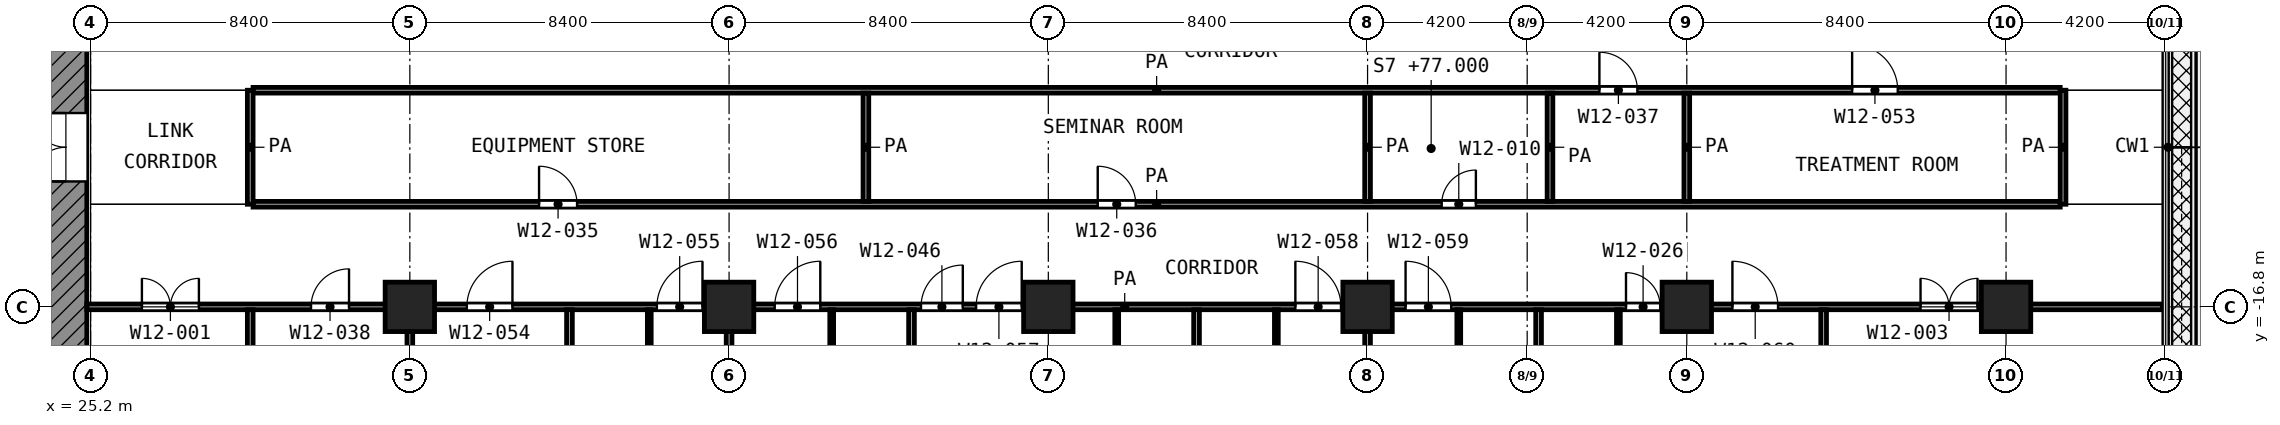
"""IFC4 building model, lengths in metres.
Left out: names, types, materials, properties, quantities, classifications, styles, units other than length and angle.
Written with IfcOpenShell. Run it as: python <this file> out.ifc"""

import sys

from ifc_helpers import new_model, si_unit, direction, frame, frame_2d, origin, origin_2d, place, context, subcontext, project, spatial, rectangle, extrude, element, fill, save


model = new_model("IFC4")
c1 = context("Model", 3, precision=1e-05, world=origin(), true_north=direction((0.0, 1.0)))
c2 = subcontext(c1, "Body", "Model", "MODEL_VIEW")
j1 = project(units=[si_unit("LENGTHUNIT", "METRE"), si_unit("PLANEANGLEUNIT", "RADIAN")], contexts=[c1])
p1 = place(None, origin())
s1 = spatial("IfcSite", under=j1, at=p1, CompositionType="ELEMENT")
p2 = place(p1, origin())
s2 = spatial("IfcBuilding", under=s1, at=p2, CompositionType="ELEMENT")
p3 = place(p2, frame((0.0, 0.0, 77.0)))
s3 = spatial("IfcBuildingStorey", under=s2, at=p3, CompositionType="ELEMENT", Elevation=77.0)
for number, where, z_axis, x_axis in (
    (1, (33.6, -16.8, 0.0), (0.0, 0.0, 1.0), (1.0, 0.0, 0.0)),
    (2, (42.0, -16.8, 0.0), (0.0, 0.0, 1.0), (1.0, 0.0, 0.0)),
    (3, (50.4, -16.8, 0.0), (0.0, 0.0, 1.0), (1.0, 0.0, 0.0)),
    (4, (58.8, -16.8, 0.0), (0.0, 0.0, 1.0), (1.0, 0.0, 0.0)),
    (5, (67.2, -16.8, 0.0), (0.0, 0.0, 1.0), (1.0, 0.0, 0.0)),
    (6, (75.6, -16.8, 0.0), (0.0, 0.0, 1.0), (1.0, 0.0, 0.0)),
):
    element("IfcColumn", number, at=place(p3, frame(where, z_axis=z_axis, x_axis=x_axis)), inside=s3, PredefinedType="COLUMN", context=c2, shape_type="SweptSolid", body=[
        extrude(rectangle(XDim=1.3, YDim=1.3, at=origin_2d()), origin(), (0.0, 0.0, 1.0), 4.2),
    ])
p4 = place(p3, frame((24.55, -24.0, 0.0), z_axis=(0.0, 0.0, 1.0), x_axis=(0.0, 1.0, 0.0)))
e7 = element("IfcWall", 7, at=p4, inside=s3, PredefinedType="SHEAR", context=c2, shape_type="SweptSolid", body=[
    extrude(rectangle(XDim=18.6, YDim=1.1, at=frame_2d((9.3, 0.0))), origin(), (0.0, 0.0, 1.0), 3.9),
])
p5 = place(p4, frame((10.5, 0.0, 0.0)))
e8 = element("IfcOpeningElement", 8, at=p5, cuts=e7, PredefinedType="OPENING", context=c2, shape_type="SweptSolid", body=[
    extrude(rectangle(XDim=1.8, YDim=2.1, at=frame_2d((0.9, 1.05))), frame((0.0, 0.56, 0.0), z_axis=(0.0, -1.0, 0.0), x_axis=(1.0, 0.0, 0.0)), (0.0, 0.0, 1.0), 1.12),
])
for number, where, z_axis, x_axis in (
    (9, (39.9, -19.5, 0.0), (0.0, 0.0, 1.0), (0.0, 1.0, 0.0)),
    (10, (44.7, -19.5, 0.0), (0.0, 0.0, 1.0), (0.0, 1.0, 0.0)),
):
    element("IfcWall", number, at=place(p3, frame(where, z_axis=z_axis, x_axis=x_axis)), inside=s3, PredefinedType="PARTITIONING", context=c2, shape_type="SweptSolid", body=[
        extrude(rectangle(XDim=2.625, YDim=0.1, at=frame_2d((1.312, 0.0))), origin(), (0.0, 0.0, 1.0), 3.9),
    ])
p6 = place(p3, frame((52.2, -19.499, 0.0), z_axis=(0.0, 0.0, 1.0), x_axis=(0.0, 1.0, 0.0)))
e11 = element("IfcWall", 11, at=p6, inside=s3, PredefinedType="PARTITIONING", context=c2, shape_type="SweptSolid", body=[
    extrude(rectangle(XDim=2.624, YDim=0.1, at=frame_2d((1.312, 0.0))), origin(), (0.0, 0.0, 1.0), 3.9),
])
for number, where, z_axis, x_axis in (
    (12, (56.4, -19.5, 0.0), (0.0, 0.0, 1.0), (0.0, 1.0, 0.0)),
    (13, (61.2, -19.5, 0.0), (0.0, 0.0, 1.0), (0.0, 1.0, 0.0)),
):
    element("IfcWall", number, at=place(p3, frame(where, z_axis=z_axis, x_axis=x_axis)), inside=s3, PredefinedType="PARTITIONING", context=c2, shape_type="SweptSolid", body=[
        extrude(rectangle(XDim=2.625, YDim=0.1, at=frame_2d((1.312, 0.0))), origin(), (0.0, 0.0, 1.0), 3.9),
    ])
p7 = place(p3, frame((65.4, -19.499, 0.0), z_axis=(0.0, 0.0, 1.0), x_axis=(0.0, 1.0, 0.0)))
e14 = element("IfcWall", 14, at=p7, inside=s3, PredefinedType="PARTITIONING", context=c2, shape_type="SweptSolid", body=[
    extrude(rectangle(XDim=2.624, YDim=0.1, at=frame_2d((1.312, 0.0))), origin(), (0.0, 0.0, 1.0), 3.9),
])
p8 = place(p3, frame((25.1, -16.8, 0.0), z_axis=(0.0, 0.0, 1.0), x_axis=(1.0, 0.0, 0.0)))
e15 = element("IfcWall", 15, at=p8, inside=s3, PredefinedType="PARTITIONING", context=c2, shape_type="SweptSolid", body=[
    extrude(rectangle(XDim=54.62, YDim=0.15, at=frame_2d((27.31, 0.0))), origin(), (0.0, 0.0, 1.0), 3.9),
])
p9 = place(p8, frame((1.45, 0.0, 0.0)))
e16 = element("IfcOpeningElement", 16, at=p9, cuts=e15, PredefinedType="OPENING", context=c2, shape_type="SweptSolid", body=[
    extrude(rectangle(XDim=1.5, YDim=2.1, at=frame_2d((0.75, 1.05))), frame((0.0, 0.085, 0.0), z_axis=(0.0, -1.0, 0.0), x_axis=(1.0, 0.0, 0.0)), (0.0, 0.0, 1.0), 0.17),
])
p10 = place(p8, frame((5.9, 0.0, 0.0)))
e17 = element("IfcOpeningElement", 17, at=p10, cuts=e15, PredefinedType="OPENING", context=c2, shape_type="SweptSolid", body=[
    extrude(rectangle(XDim=1.0, YDim=2.1, at=frame_2d((0.5, 1.05))), frame((0.0, 0.085, 0.0), z_axis=(0.0, -1.0, 0.0), x_axis=(1.0, 0.0, 0.0)), (0.0, 0.0, 1.0), 0.17),
])
p11 = place(p8, frame((10.0, 0.0, 0.0)))
e18 = element("IfcOpeningElement", 18, at=p11, cuts=e15, PredefinedType="OPENING", context=c2, shape_type="SweptSolid", body=[
    extrude(rectangle(XDim=1.2, YDim=2.1, at=frame_2d((0.6, 1.05))), frame((0.0, 0.085, 0.0), z_axis=(0.0, -1.0, 0.0), x_axis=(1.0, 0.0, 0.0)), (0.0, 0.0, 1.0), 0.17),
])
p12 = place(p8, frame((15.0, 0.0, 0.0)))
e19 = element("IfcOpeningElement", 19, at=p12, cuts=e15, PredefinedType="OPENING", context=c2, shape_type="SweptSolid", body=[
    extrude(rectangle(XDim=1.2, YDim=2.1, at=frame_2d((0.6, 1.05))), frame((0.0, 0.085, 0.0), z_axis=(0.0, -1.0, 0.0), x_axis=(1.0, 0.0, 0.0)), (0.0, 0.0, 1.0), 0.17),
])
p13 = place(p8, frame((18.1, 0.0, 0.0)))
e20 = element("IfcOpeningElement", 20, at=p13, cuts=e15, PredefinedType="OPENING", context=c2, shape_type="SweptSolid", body=[
    extrude(rectangle(XDim=1.2, YDim=2.1, at=frame_2d((0.6, 1.05))), frame((0.0, 0.085, 0.0), z_axis=(0.0, -1.0, 0.0), x_axis=(1.0, 0.0, 0.0)), (0.0, 0.0, 1.0), 0.17),
])
p14 = place(p8, frame((23.4, 0.0, 0.0)))
e21 = element("IfcOpeningElement", 21, at=p14, cuts=e15, PredefinedType="OPENING", context=c2, shape_type="SweptSolid", body=[
    extrude(rectangle(XDim=1.2, YDim=2.1, at=frame_2d((0.6, 1.05))), frame((0.0, 0.085, 0.0), z_axis=(0.0, -1.0, 0.0), x_axis=(1.0, 0.0, 0.0)), (0.0, 0.0, 1.0), 0.17),
])
p15 = place(p8, frame((21.95, 0.0, 0.0)))
e22 = element("IfcOpeningElement", 22, at=p15, cuts=e15, PredefinedType="OPENING", context=c2, shape_type="SweptSolid", body=[
    extrude(rectangle(XDim=1.1, YDim=2.1, at=frame_2d((0.55, 1.05))), frame((0.0, 0.085, 0.0), z_axis=(0.0, -1.0, 0.0), x_axis=(1.0, 0.0, 0.0)), (0.0, 0.0, 1.0), 0.17),
])
p16 = place(p8, frame((31.8, 0.0, 0.0)))
e23 = element("IfcOpeningElement", 23, at=p16, cuts=e15, PredefinedType="OPENING", context=c2, shape_type="SweptSolid", body=[
    extrude(rectangle(XDim=1.2, YDim=2.1, at=frame_2d((0.6, 1.05))), frame((0.0, 0.085, 0.0), z_axis=(0.0, -1.0, 0.0), x_axis=(1.0, 0.0, 0.0)), (0.0, 0.0, 1.0), 0.17),
])
p17 = place(p8, frame((34.7, 0.0, 0.0)))
e24 = element("IfcOpeningElement", 24, at=p17, cuts=e15, PredefinedType="OPENING", context=c2, shape_type="SweptSolid", body=[
    extrude(rectangle(XDim=1.2, YDim=2.1, at=frame_2d((0.6, 1.05))), frame((0.0, 0.085, 0.0), z_axis=(0.0, -1.0, 0.0), x_axis=(1.0, 0.0, 0.0)), (0.0, 0.0, 1.0), 0.17),
])
p18 = place(p8, frame((43.3, 0.0, 0.0)))
e25 = element("IfcOpeningElement", 25, at=p18, cuts=e15, PredefinedType="OPENING", context=c2, shape_type="SweptSolid", body=[
    extrude(rectangle(XDim=1.2, YDim=2.1, at=frame_2d((0.6, 1.05))), frame((0.0, 0.085, 0.0), z_axis=(0.0, -1.0, 0.0), x_axis=(1.0, 0.0, 0.0)), (0.0, 0.0, 1.0), 0.17),
])
p19 = place(p8, frame((40.5, 0.0, 0.0)))
e26 = element("IfcOpeningElement", 26, at=p19, cuts=e15, PredefinedType="OPENING", context=c2, shape_type="SweptSolid", body=[
    extrude(rectangle(XDim=0.9, YDim=2.1, at=frame_2d((0.45, 1.05))), frame((0.0, 0.085, 0.0), z_axis=(0.0, -1.0, 0.0), x_axis=(1.0, 0.0, 0.0)), (0.0, 0.0, 1.0), 0.17),
])
p20 = place(p8, frame((48.25, 0.0, 0.0)))
e27 = element("IfcOpeningElement", 27, at=p20, cuts=e15, PredefinedType="OPENING", context=c2, shape_type="SweptSolid", body=[
    extrude(rectangle(XDim=1.5, YDim=2.1, at=frame_2d((0.75, 1.05))), frame((0.0, 0.085, 0.0), z_axis=(0.0, -1.0, 0.0), x_axis=(1.0, 0.0, 0.0)), (0.0, 0.0, 1.0), 0.17),
])
p21 = place(p3, frame((29.475, -14.1, 0.0), z_axis=(0.0, 0.0, 1.0), x_axis=(1.0, 0.0, 0.0)))
e28 = element("IfcWall", 28, at=p21, inside=s3, PredefinedType="PARTITIONING", context=c2, shape_type="SweptSolid", body=[
    extrude(rectangle(XDim=47.55, YDim=0.15, at=frame_2d((23.775, 0.0))), origin(), (0.0, 0.0, 1.0), 3.9),
])
p22 = place(p21, frame((7.525, 0.0, 0.0)))
e29 = element("IfcOpeningElement", 29, at=p22, cuts=e28, PredefinedType="OPENING", context=c2, shape_type="SweptSolid", body=[
    extrude(rectangle(XDim=1.0, YDim=2.1, at=frame_2d((0.5, 1.05))), frame((0.0, 0.085, 0.0), z_axis=(0.0, -1.0, 0.0), x_axis=(1.0, 0.0, 0.0)), (0.0, 0.0, 1.0), 0.17),
])
p23 = place(p21, frame((22.225, 0.0, 0.0)))
e30 = element("IfcOpeningElement", 30, at=p23, cuts=e28, PredefinedType="OPENING", context=c2, shape_type="SweptSolid", body=[
    extrude(rectangle(XDim=1.0, YDim=2.1, at=frame_2d((0.5, 1.05))), frame((0.0, 0.085, 0.0), z_axis=(0.0, -1.0, 0.0), x_axis=(1.0, 0.0, 0.0)), (0.0, 0.0, 1.0), 0.17),
])
p24 = place(p21, frame((31.275, 0.0, 0.0)))
e31 = element("IfcOpeningElement", 31, at=p24, cuts=e28, PredefinedType="OPENING", context=c2, shape_type="SweptSolid", body=[
    extrude(rectangle(XDim=0.9, YDim=2.1, at=frame_2d((0.45, 1.05))), frame((0.0, 0.085, 0.0), z_axis=(0.0, -1.0, 0.0), x_axis=(1.0, 0.0, 0.0)), (0.0, 0.0, 1.0), 0.17),
])
p25 = place(p3, frame((29.475, -11.1, 0.0), z_axis=(0.0, 0.0, 1.0), x_axis=(1.0, 0.0, 0.0)))
e32 = element("IfcWall", 32, at=p25, inside=s3, PredefinedType="PARTITIONING", context=c2, shape_type="SweptSolid", body=[
    extrude(rectangle(XDim=47.55, YDim=0.15, at=frame_2d((23.775, 0.0))), origin(), (0.0, 0.0, 1.0), 3.9),
])
p26 = place(p25, frame((35.425, 0.0, 0.0)))
e33 = element("IfcOpeningElement", 33, at=p26, cuts=e32, PredefinedType="OPENING", context=c2, shape_type="SweptSolid", body=[
    extrude(rectangle(XDim=1.0, YDim=2.1, at=frame_2d((0.5, 1.05))), frame((0.0, 0.085, 0.0), z_axis=(0.0, -1.0, 0.0), x_axis=(1.0, 0.0, 0.0)), (0.0, 0.0, 1.0), 0.17),
])
p27 = place(p25, frame((42.075, 0.0, 0.0)))
e34 = element("IfcOpeningElement", 34, at=p27, cuts=e32, PredefinedType="OPENING", context=c2, shape_type="SweptSolid", body=[
    extrude(rectangle(XDim=1.2, YDim=2.1, at=frame_2d((0.6, 1.05))), frame((0.0, 0.085, 0.0), z_axis=(0.0, -1.0, 0.0), x_axis=(1.0, 0.0, 0.0)), (0.0, 0.0, 1.0), 0.17),
])
p28 = place(p3, frame((29.4, -25.2, 0.0), z_axis=(0.0, 0.0, 1.0), x_axis=(0.0, 1.0, 0.0)))
e35 = element("IfcWall", 35, at=p28, inside=s3, PredefinedType="PARTITIONING", context=c2, shape_type="SweptSolid", body=[
    extrude(rectangle(XDim=8.325, YDim=0.15, at=frame_2d((4.163, 0.0))), origin(), (0.0, 0.0, 1.0), 3.9),
])
p29 = place(p3, frame((29.4, -14.1, 0.0), z_axis=(0.0, 0.0, 1.0), x_axis=(0.0, 1.0, 0.0)))
e36 = element("IfcWall", 36, at=p29, inside=s3, PredefinedType="PARTITIONING", context=c2, shape_type="SweptSolid", body=[
    extrude(rectangle(XDim=3.0, YDim=0.15, at=frame_2d((1.5, 0.0))), origin(), (0.0, 0.0, 1.0), 3.9),
])
for number, where, z_axis, x_axis in (
    (37, (33.6, -25.12, 0.0), (0.0, 0.0, 1.0), (0.0, 1.0, 0.0)),
    (38, (37.8, -25.12, 0.0), (0.0, 0.0, 1.0), (0.0, 1.0, 0.0)),
    (39, (42.0, -25.12, 0.0), (0.0, 0.0, 1.0), (0.0, 1.0, 0.0)),
):
    element("IfcWall", number, at=place(p3, frame(where, z_axis=z_axis, x_axis=x_axis)), inside=s3, PredefinedType="PARTITIONING", context=c2, shape_type="SweptSolid", body=[
        extrude(rectangle(XDim=8.245, YDim=0.15, at=frame_2d((4.123, 0.0))), origin(), (0.0, 0.0, 1.0), 3.9),
    ])
p30 = place(p3, frame((45.6, -14.025, 0.0), z_axis=(0.0, 0.0, 1.0), x_axis=(0.0, 1.0, 0.0)))
e40 = element("IfcWall", 40, at=p30, inside=s3, PredefinedType="PARTITIONING", context=c2, shape_type="SweptSolid", body=[
    extrude(rectangle(XDim=2.85, YDim=0.15, at=frame_2d((1.425, 0.0))), origin(), (0.0, 0.0, 1.0), 3.9),
])
for number, where, z_axis, x_axis in (
    (41, (46.8, -25.12, 0.0), (0.0, 0.0, 1.0), (0.0, 1.0, 0.0)),
    (42, (54.3, -25.12, 0.0), (0.0, 0.0, 1.0), (0.0, 1.0, 0.0)),
    (43, (58.8, -25.12, 0.0), (0.0, 0.0, 1.0), (0.0, 1.0, 0.0)),
):
    element("IfcWall", number, at=place(p3, frame(where, z_axis=z_axis, x_axis=x_axis)), inside=s3, PredefinedType="PARTITIONING", context=c2, shape_type="SweptSolid", body=[
        extrude(rectangle(XDim=8.245, YDim=0.15, at=frame_2d((4.123, 0.0))), origin(), (0.0, 0.0, 1.0), 3.9),
    ])
p31 = place(p3, frame((58.8, -14.025, 0.0), z_axis=(0.0, 0.0, 1.0), x_axis=(0.0, 1.0, 0.0)))
e44 = element("IfcWall", 44, at=p31, inside=s3, PredefinedType="PARTITIONING", context=c2, shape_type="SweptSolid", body=[
    extrude(rectangle(XDim=2.85, YDim=0.15, at=frame_2d((1.425, 0.0))), origin(), (0.0, 0.0, 1.0), 3.9),
])
p32 = place(p3, frame((63.3, -25.12, 0.0), z_axis=(0.0, 0.0, 1.0), x_axis=(0.0, 1.0, 0.0)))
e45 = element("IfcWall", 45, at=p32, inside=s3, PredefinedType="PARTITIONING", context=c2, shape_type="SweptSolid", body=[
    extrude(rectangle(XDim=8.245, YDim=0.15, at=frame_2d((4.123, 0.0))), origin(), (0.0, 0.0, 1.0), 3.9),
])
for number, where, z_axis, x_axis in (
    (46, (63.6, -14.025, 0.0), (0.0, 0.0, 1.0), (0.0, 1.0, 0.0)),
    (47, (67.2, -14.025, 0.0), (0.0, 0.0, 1.0), (0.0, 1.0, 0.0)),
):
    element("IfcWall", number, at=place(p3, frame(where, z_axis=z_axis, x_axis=x_axis)), inside=s3, PredefinedType="PARTITIONING", context=c2, shape_type="SweptSolid", body=[
        extrude(rectangle(XDim=2.85, YDim=0.15, at=frame_2d((1.425, 0.0))), origin(), (0.0, 0.0, 1.0), 3.9),
    ])
p33 = place(p3, frame((70.8, -25.12, 0.0), z_axis=(0.0, 0.0, 1.0), x_axis=(0.0, 1.0, 0.0)))
e48 = element("IfcWall", 48, at=p33, inside=s3, PredefinedType="PARTITIONING", context=c2, shape_type="SweptSolid", body=[
    extrude(rectangle(XDim=8.245, YDim=0.15, at=frame_2d((4.123, 0.0))), origin(), (0.0, 0.0, 1.0), 3.9),
])
p34 = place(p3, frame((77.1, -14.1, 0.0), z_axis=(0.0, 0.0, 1.0), x_axis=(0.0, 1.0, 0.0)))
e49 = element("IfcWall", 49, at=p34, inside=s3, PredefinedType="PARTITIONING", context=c2, shape_type="SweptSolid", body=[
    extrude(rectangle(XDim=3.0, YDim=0.15, at=frame_2d((1.5, 0.0))), origin(), (0.0, 0.0, 1.0), 3.9),
])
p35 = place(p5, origin())
e50 = element("IfcDoor", 50, at=p35, inside=s3, OperationType="DOUBLE_DOOR_SINGLE_SWING", PredefinedType="DOOR", context=c2, shape_type="SweptSolid", body=[
    extrude(rectangle(XDim=1.8, YDim=2.1, at=frame_2d((0.9, 1.05))), frame((0.0, 0.025, 0.0), z_axis=(0.0, -1.0, 0.0), x_axis=(1.0, 0.0, 0.0)), (0.0, 0.0, 1.0), 0.05),
])
fill(e8, e50)
p36 = place(p9, origin())
e51 = element("IfcDoor", 51, at=p36, inside=s3, OperationType="DOUBLE_DOOR_SINGLE_SWING", PredefinedType="DOOR", context=c2, shape_type="SweptSolid", body=[
    extrude(rectangle(XDim=1.5, YDim=2.1, at=frame_2d((0.75, 1.05))), frame((0.0, 0.025, 0.0), z_axis=(0.0, -1.0, 0.0), x_axis=(1.0, 0.0, 0.0)), (0.0, 0.0, 1.0), 0.05),
])
fill(e16, e51)
p37 = place(p22, origin())
e52 = element("IfcDoor", 52, at=p37, inside=s3, OperationType="SINGLE_SWING_LEFT", PredefinedType="DOOR", context=c2, shape_type="SweptSolid", body=[
    extrude(rectangle(XDim=1.0, YDim=2.1, at=frame_2d((0.5, 1.05))), frame((0.0, 0.025, 0.0), z_axis=(0.0, -1.0, 0.0), x_axis=(1.0, 0.0, 0.0)), (0.0, 0.0, 1.0), 0.05),
])
fill(e29, e52)
p38 = place(p23, origin())
e53 = element("IfcDoor", 53, at=p38, inside=s3, OperationType="SINGLE_SWING_LEFT", PredefinedType="DOOR", context=c2, shape_type="SweptSolid", body=[
    extrude(rectangle(XDim=1.0, YDim=2.1, at=frame_2d((0.5, 1.05))), frame((0.0, 0.025, 0.0), z_axis=(0.0, -1.0, 0.0), x_axis=(1.0, 0.0, 0.0)), (0.0, 0.0, 1.0), 0.05),
])
fill(e30, e53)
p39 = place(p24, origin())
e54 = element("IfcDoor", 54, at=p39, inside=s3, OperationType="SINGLE_SWING_RIGHT", PredefinedType="DOOR", context=c2, shape_type="SweptSolid", body=[
    extrude(rectangle(XDim=0.9, YDim=2.1, at=frame_2d((0.45, 1.05))), frame((0.0, 0.025, 0.0), z_axis=(0.0, -1.0, 0.0), x_axis=(1.0, 0.0, 0.0)), (0.0, 0.0, 1.0), 0.05),
])
fill(e31, e54)
p40 = place(p26, origin())
e55 = element("IfcDoor", 55, at=p40, inside=s3, OperationType="SINGLE_SWING_LEFT", PredefinedType="DOOR", context=c2, shape_type="SweptSolid", body=[
    extrude(rectangle(XDim=1.0, YDim=2.1, at=frame_2d((0.5, 1.05))), frame((0.0, 0.025, 0.0), z_axis=(0.0, -1.0, 0.0), x_axis=(1.0, 0.0, 0.0)), (0.0, 0.0, 1.0), 0.05),
])
fill(e33, e55)
p41 = place(p27, origin())
e56 = element("IfcDoor", 56, at=p41, inside=s3, OperationType="SINGLE_SWING_LEFT", PredefinedType="DOOR", context=c2, shape_type="SweptSolid", body=[
    extrude(rectangle(XDim=1.2, YDim=2.1, at=frame_2d((0.6, 1.05))), frame((0.0, 0.025, 0.0), z_axis=(0.0, -1.0, 0.0), x_axis=(1.0, 0.0, 0.0)), (0.0, 0.0, 1.0), 0.05),
])
fill(e34, e56)
p42 = place(p10, origin())
e57 = element("IfcDoor", 57, at=p42, inside=s3, OperationType="SINGLE_SWING_RIGHT", PredefinedType="DOOR", context=c2, shape_type="SweptSolid", body=[
    extrude(rectangle(XDim=1.0, YDim=2.1, at=frame_2d((0.5, 1.05))), frame((0.0, 0.025, 0.0), z_axis=(0.0, -1.0, 0.0), x_axis=(1.0, 0.0, 0.0)), (0.0, 0.0, 1.0), 0.05),
])
fill(e17, e57)
p43 = place(p11, origin())
e58 = element("IfcDoor", 58, at=p43, inside=s3, OperationType="SINGLE_SWING_RIGHT", PredefinedType="DOOR", context=c2, shape_type="SweptSolid", body=[
    extrude(rectangle(XDim=1.2, YDim=2.1, at=frame_2d((0.6, 1.05))), frame((0.0, 0.025, 0.0), z_axis=(0.0, -1.0, 0.0), x_axis=(1.0, 0.0, 0.0)), (0.0, 0.0, 1.0), 0.05),
])
fill(e18, e58)
p44 = place(p12, origin())
e59 = element("IfcDoor", 59, at=p44, inside=s3, OperationType="SINGLE_SWING_RIGHT", PredefinedType="DOOR", context=c2, shape_type="SweptSolid", body=[
    extrude(rectangle(XDim=1.2, YDim=2.1, at=frame_2d((0.6, 1.05))), frame((0.0, 0.025, 0.0), z_axis=(0.0, -1.0, 0.0), x_axis=(1.0, 0.0, 0.0)), (0.0, 0.0, 1.0), 0.05),
])
fill(e19, e59)
p45 = place(p13, origin())
e60 = element("IfcDoor", 60, at=p45, inside=s3, OperationType="SINGLE_SWING_RIGHT", PredefinedType="DOOR", context=c2, shape_type="SweptSolid", body=[
    extrude(rectangle(XDim=1.2, YDim=2.1, at=frame_2d((0.6, 1.05))), frame((0.0, 0.025, 0.0), z_axis=(0.0, -1.0, 0.0), x_axis=(1.0, 0.0, 0.0)), (0.0, 0.0, 1.0), 0.05),
])
fill(e20, e60)
p46 = place(p14, origin())
e61 = element("IfcDoor", 61, at=p46, inside=s3, OperationType="SINGLE_SWING_RIGHT", PredefinedType="DOOR", context=c2, shape_type="SweptSolid", body=[
    extrude(rectangle(XDim=1.2, YDim=2.1, at=frame_2d((0.6, 1.05))), frame((0.0, 0.025, 0.0), z_axis=(0.0, -1.0, 0.0), x_axis=(1.0, 0.0, 0.0)), (0.0, 0.0, 1.0), 0.05),
])
fill(e21, e61)
p47 = place(p15, origin())
e62 = element("IfcDoor", 62, at=p47, inside=s3, OperationType="SINGLE_SWING_RIGHT", PredefinedType="DOOR", context=c2, shape_type="SweptSolid", body=[
    extrude(rectangle(XDim=1.1, YDim=2.1, at=frame_2d((0.55, 1.05))), frame((0.0, 0.025, 0.0), z_axis=(0.0, -1.0, 0.0), x_axis=(1.0, 0.0, 0.0)), (0.0, 0.0, 1.0), 0.05),
])
fill(e22, e62)
p48 = place(p16, origin())
e63 = element("IfcDoor", 63, at=p48, inside=s3, OperationType="SINGLE_SWING_LEFT", PredefinedType="DOOR", context=c2, shape_type="SweptSolid", body=[
    extrude(rectangle(XDim=1.2, YDim=2.1, at=frame_2d((0.6, 1.05))), frame((0.0, 0.025, 0.0), z_axis=(0.0, -1.0, 0.0), x_axis=(1.0, 0.0, 0.0)), (0.0, 0.0, 1.0), 0.05),
])
fill(e23, e63)
p49 = place(p17, origin())
e64 = element("IfcDoor", 64, at=p49, inside=s3, OperationType="SINGLE_SWING_LEFT", PredefinedType="DOOR", context=c2, shape_type="SweptSolid", body=[
    extrude(rectangle(XDim=1.2, YDim=2.1, at=frame_2d((0.6, 1.05))), frame((0.0, 0.025, 0.0), z_axis=(0.0, -1.0, 0.0), x_axis=(1.0, 0.0, 0.0)), (0.0, 0.0, 1.0), 0.05),
])
fill(e24, e64)
p50 = place(p18, origin())
e65 = element("IfcDoor", 65, at=p50, inside=s3, OperationType="SINGLE_SWING_LEFT", PredefinedType="DOOR", context=c2, shape_type="SweptSolid", body=[
    extrude(rectangle(XDim=1.2, YDim=2.1, at=frame_2d((0.6, 1.05))), frame((0.0, 0.025, 0.0), z_axis=(0.0, -1.0, 0.0), x_axis=(1.0, 0.0, 0.0)), (0.0, 0.0, 1.0), 0.05),
])
fill(e25, e65)
p51 = place(p19, origin())
e66 = element("IfcDoor", 66, at=p51, inside=s3, OperationType="SINGLE_SWING_LEFT", PredefinedType="DOOR", context=c2, shape_type="SweptSolid", body=[
    extrude(rectangle(XDim=0.9, YDim=2.1, at=frame_2d((0.45, 1.05))), frame((0.0, 0.025, 0.0), z_axis=(0.0, -1.0, 0.0), x_axis=(1.0, 0.0, 0.0)), (0.0, 0.0, 1.0), 0.05),
])
fill(e26, e66)
p52 = place(p20, origin())
e67 = element("IfcDoor", 67, at=p52, inside=s3, OperationType="DOUBLE_DOOR_SINGLE_SWING", PredefinedType="DOOR", context=c2, shape_type="SweptSolid", body=[
    extrude(rectangle(XDim=1.5, YDim=2.1, at=frame_2d((0.75, 1.05))), frame((0.0, 0.025, 0.0), z_axis=(0.0, -1.0, 0.0), x_axis=(1.0, 0.0, 0.0)), (0.0, 0.0, 1.0), 0.05),
])
fill(e27, e67)
save(model, sys.argv[1])
